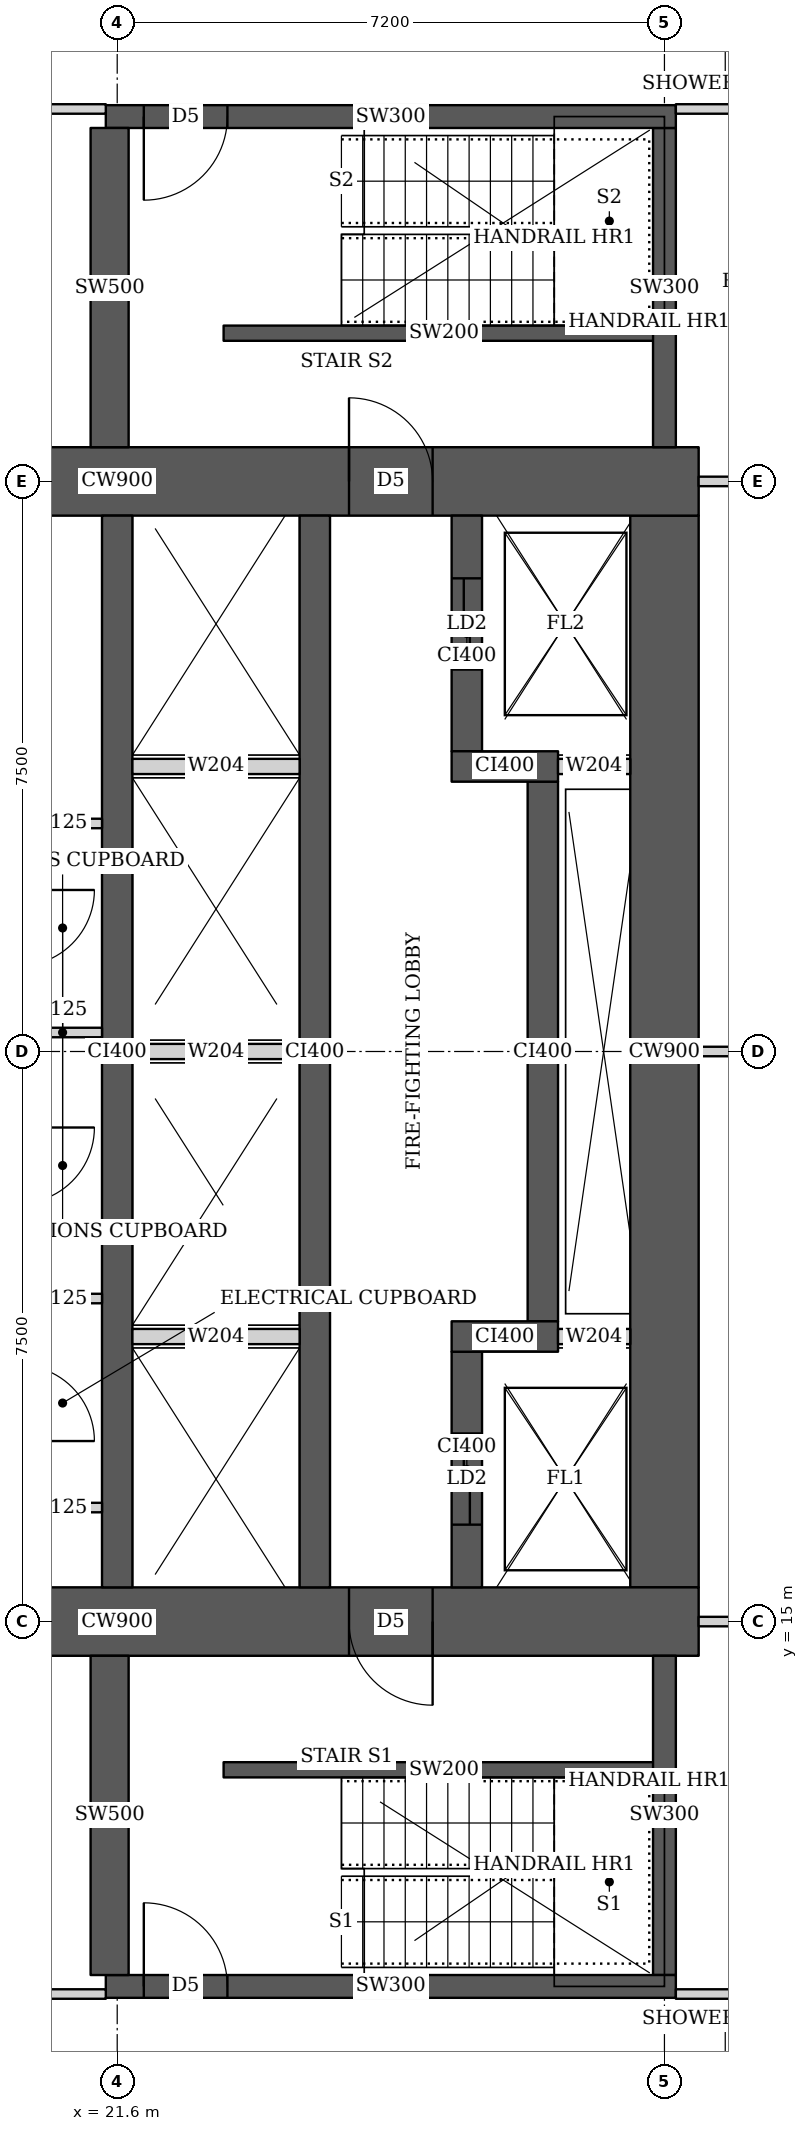
"""IFC4 building model, lengths in metres.
Left out: names, types, materials, properties, quantities, classifications, styles, units other than length and angle.
Written with IfcOpenShell. Run it as: python <this file> out.ifc"""

import sys

from ifc_helpers import new_model, si_unit, direction, frame, frame_2d, origin, place, context, subcontext, project, spatial, rectangle, extrude, element, fill, save


model = new_model("IFC4")
c1 = context("Model", 3, precision=1e-05, world=origin(), true_north=direction((0.0, 1.0)))
c2 = subcontext(c1, "Body", "Model", "MODEL_VIEW")
j1 = project(units=[si_unit("LENGTHUNIT", "METRE"), si_unit("PLANEANGLEUNIT", "RADIAN")], contexts=[c1])
p1 = place(None, origin())
s1 = spatial("IfcSite", under=j1, at=p1, CompositionType="ELEMENT")
p2 = place(p1, origin())
s2 = spatial("IfcBuilding", under=s1, at=p2, CompositionType="ELEMENT")
p3 = place(p2, frame((0.0, 0.0, 100.4)))
s3 = spatial("IfcBuildingStorey", under=s2, at=p3, CompositionType="ELEMENT", Elevation=100.4)
p4 = place(p3, frame((13.95, 15.0, 0.0), z_axis=(0.0, 0.0, 1.0), x_axis=(1.0, 0.0, 0.0)))
e1 = element("IfcWall", 1, at=p4, inside=s3, PredefinedType="SHEAR", context=c2, shape_type="SweptSolid", body=[
    extrude(rectangle(XDim=15.3, YDim=0.9, at=frame_2d((7.65, 0.0))), origin(), (0.0, 0.0, 1.0), 3.75),
])
p5 = place(p4, frame((4.45, 0.0, 0.0)))
e2 = element("IfcOpeningElement", 2, at=p5, cuts=e1, PredefinedType="OPENING", context=c2, shape_type="SweptSolid", body=[
    extrude(rectangle(XDim=1.8, YDim=2.1, at=frame_2d((0.9, 1.05))), frame((0.0, 0.46, 0.0), z_axis=(0.0, -1.0, 0.0), x_axis=(1.0, 0.0, 0.0)), (0.0, 0.0, 1.0), 0.92),
])
p6 = place(p4, frame((10.7, 0.0, 0.0)))
e3 = element("IfcOpeningElement", 3, at=p6, cuts=e1, PredefinedType="OPENING", context=c2, shape_type="SweptSolid", body=[
    extrude(rectangle(XDim=1.1, YDim=2.1, at=frame_2d((0.55, 1.05))), frame((0.0, 0.46, 0.0), z_axis=(0.0, -1.0, 0.0), x_axis=(1.0, 0.0, 0.0)), (0.0, 0.0, 1.0), 0.92),
])
p7 = place(p3, frame((13.95, 30.0, 0.0), z_axis=(0.0, 0.0, 1.0), x_axis=(1.0, 0.0, 0.0)))
e4 = element("IfcWall", 4, at=p7, inside=s3, PredefinedType="SHEAR", context=c2, shape_type="SweptSolid", body=[
    extrude(rectangle(XDim=15.3, YDim=0.9, at=frame_2d((7.65, 0.0))), origin(), (0.0, 0.0, 1.0), 3.75),
])
p8 = place(p7, frame((4.45, 0.0, 0.0)))
e5 = element("IfcOpeningElement", 5, at=p8, cuts=e4, PredefinedType="OPENING", context=c2, shape_type="SweptSolid", body=[
    extrude(rectangle(XDim=1.8, YDim=2.1, at=frame_2d((0.9, 1.05))), frame((0.0, 0.46, 0.0), z_axis=(0.0, -1.0, 0.0), x_axis=(1.0, 0.0, 0.0)), (0.0, 0.0, 1.0), 0.92),
])
p9 = place(p7, frame((10.7, 0.0, 0.0)))
e6 = element("IfcOpeningElement", 6, at=p9, cuts=e4, PredefinedType="OPENING", context=c2, shape_type="SweptSolid", body=[
    extrude(rectangle(XDim=1.1, YDim=2.1, at=frame_2d((0.55, 1.05))), frame((0.0, 0.46, 0.0), z_axis=(0.0, -1.0, 0.0), x_axis=(1.0, 0.0, 0.0)), (0.0, 0.0, 1.0), 0.92),
])
p10 = place(p3, frame((28.8, 15.45, 0.0), z_axis=(0.0, 0.0, 1.0), x_axis=(0.0, 1.0, 0.0)))
e7 = element("IfcWall", 7, at=p10, inside=s3, PredefinedType="SHEAR", context=c2, shape_type="SweptSolid", body=[
    extrude(rectangle(XDim=14.1, YDim=0.9, at=frame_2d((7.05, 0.0))), origin(), (0.0, 0.0, 1.0), 3.75),
])
for number, where, z_axis, x_axis in (
    (8, (21.6, 15.45, 0.0), (0.0, 0.0, 1.0), (0.0, 1.0, 0.0)),
    (9, (24.2, 15.45, 0.0), (0.0, 0.0, 1.0), (0.0, 1.0, 0.0)),
):
    element("IfcWall", number, at=place(p3, frame(where, z_axis=z_axis, x_axis=x_axis)), inside=s3, PredefinedType="SHEAR", context=c2, shape_type="SweptSolid", body=[
        extrude(rectangle(XDim=14.1, YDim=0.4, at=frame_2d((7.05, 0.0))), origin(), (0.0, 0.0, 1.0), 3.75),
    ])
p11 = place(p3, frame((26.2, 15.45, 0.0), z_axis=(0.0, 0.0, 1.0), x_axis=(0.0, 1.0, 0.0)))
e10 = element("IfcWall", 10, at=p11, inside=s3, PredefinedType="SHEAR", context=c2, shape_type="SweptSolid", body=[
    extrude(rectangle(XDim=3.1, YDim=0.4, at=frame_2d((1.55, 0.0))), origin(), (0.0, 0.0, 1.0), 3.75),
])
p12 = place(p11, frame((0.825, 0.0, 0.0)))
e11 = element("IfcOpeningElement", 11, at=p12, cuts=e10, PredefinedType="OPENING", context=c2, shape_type="SweptSolid", body=[
    extrude(rectangle(XDim=1.2, YDim=2.1, at=frame_2d((0.6, 1.05))), frame((0.0, 0.21, 0.0), z_axis=(0.0, -1.0, 0.0), x_axis=(1.0, 0.0, 0.0)), (0.0, 0.0, 1.0), 0.42),
])
p13 = place(p3, frame((26.0, 18.75, 0.0), z_axis=(0.0, 0.0, 1.0), x_axis=(1.0, 0.0, 0.0)))
e12 = element("IfcWall", 12, at=p13, inside=s3, PredefinedType="SHEAR", context=c2, shape_type="SweptSolid", body=[
    extrude(rectangle(XDim=1.4, YDim=0.4, at=frame_2d((0.7, 0.0))), origin(), (0.0, 0.0, 1.0), 3.75),
])
p14 = place(p3, frame((27.2, 18.95, 0.0), z_axis=(0.0, 0.0, 1.0), x_axis=(0.0, 1.0, 0.0)))
e13 = element("IfcWall", 13, at=p14, inside=s3, PredefinedType="SHEAR", context=c2, shape_type="SweptSolid", body=[
    extrude(rectangle(XDim=7.1, YDim=0.4, at=frame_2d((3.55, 0.0))), origin(), (0.0, 0.0, 1.0), 3.75),
])
p15 = place(p3, frame((26.0, 26.25, 0.0), z_axis=(0.0, 0.0, 1.0), x_axis=(1.0, 0.0, 0.0)))
e14 = element("IfcWall", 14, at=p15, inside=s3, PredefinedType="SHEAR", context=c2, shape_type="SweptSolid", body=[
    extrude(rectangle(XDim=1.4, YDim=0.4, at=frame_2d((0.7, 0.0))), origin(), (0.0, 0.0, 1.0), 3.75),
])
p16 = place(p3, frame((26.2, 26.45, 0.0), z_axis=(0.0, 0.0, 1.0), x_axis=(0.0, 1.0, 0.0)))
e15 = element("IfcWall", 15, at=p16, inside=s3, PredefinedType="SHEAR", context=c2, shape_type="SweptSolid", body=[
    extrude(rectangle(XDim=3.1, YDim=0.4, at=frame_2d((1.55, 0.0))), origin(), (0.0, 0.0, 1.0), 3.75),
])
p17 = place(p16, frame((1.075, 0.0, 0.0)))
e16 = element("IfcOpeningElement", 16, at=p17, cuts=e15, PredefinedType="OPENING", context=c2, shape_type="SweptSolid", body=[
    extrude(rectangle(XDim=1.2, YDim=2.1, at=frame_2d((0.6, 1.05))), frame((0.0, 0.21, 0.0), z_axis=(0.0, -1.0, 0.0), x_axis=(1.0, 0.0, 0.0)), (0.0, 0.0, 1.0), 0.42),
])
p18 = place(p3, frame((21.45, 10.2, 0.0), z_axis=(0.0, 0.0, 1.0), x_axis=(1.0, 0.0, 0.0)))
e17 = element("IfcWall", 17, at=p18, inside=s3, PredefinedType="SHEAR", context=c2, shape_type="SweptSolid", body=[
    extrude(rectangle(XDim=7.5, YDim=0.3, at=frame_2d((3.75, 0.0))), origin(), (0.0, 0.0, 1.0), 3.75),
])
p19 = place(p18, frame((0.5, 0.0, 0.0)))
e18 = element("IfcOpeningElement", 18, at=p19, cuts=e17, PredefinedType="OPENING", context=c2, shape_type="SweptSolid", body=[
    extrude(rectangle(XDim=1.1, YDim=2.1, at=frame_2d((0.55, 1.05))), frame((0.0, 0.16, 0.0), z_axis=(0.0, -1.0, 0.0), x_axis=(1.0, 0.0, 0.0)), (0.0, 0.0, 1.0), 0.32),
])
p20 = place(p3, frame((21.5, 10.35, 0.0), z_axis=(0.0, 0.0, 1.0), x_axis=(0.0, 1.0, 0.0)))
e19 = element("IfcWall", 19, at=p20, inside=s3, PredefinedType="SHEAR", context=c2, shape_type="SweptSolid", body=[
    extrude(rectangle(XDim=4.2, YDim=0.5, at=frame_2d((2.1, 0.0))), origin(), (0.0, 0.0, 1.0), 3.75),
])
p21 = place(p3, frame((28.8, 10.35, 0.0), z_axis=(0.0, 0.0, 1.0), x_axis=(0.0, 1.0, 0.0)))
e20 = element("IfcWall", 20, at=p21, inside=s3, PredefinedType="SHEAR", context=c2, shape_type="SweptSolid", body=[
    extrude(rectangle(XDim=4.2, YDim=0.3, at=frame_2d((2.1, 0.0))), origin(), (0.0, 0.0, 1.0), 3.75),
])
p22 = place(p3, frame((21.45, 34.8, 0.0), z_axis=(0.0, 0.0, 1.0), x_axis=(1.0, 0.0, 0.0)))
e21 = element("IfcWall", 21, at=p22, inside=s3, PredefinedType="SHEAR", context=c2, shape_type="SweptSolid", body=[
    extrude(rectangle(XDim=7.5, YDim=0.3, at=frame_2d((3.75, 0.0))), origin(), (0.0, 0.0, 1.0), 3.75),
])
p23 = place(p22, frame((0.5, 0.0, 0.0)))
e22 = element("IfcOpeningElement", 22, at=p23, cuts=e21, PredefinedType="OPENING", context=c2, shape_type="SweptSolid", body=[
    extrude(rectangle(XDim=1.1, YDim=2.1, at=frame_2d((0.55, 1.05))), frame((0.0, 0.16, 0.0), z_axis=(0.0, -1.0, 0.0), x_axis=(1.0, 0.0, 0.0)), (0.0, 0.0, 1.0), 0.32),
])
p24 = place(p3, frame((21.5, 30.45, 0.0), z_axis=(0.0, 0.0, 1.0), x_axis=(0.0, 1.0, 0.0)))
e23 = element("IfcWall", 23, at=p24, inside=s3, PredefinedType="SHEAR", context=c2, shape_type="SweptSolid", body=[
    extrude(rectangle(XDim=4.2, YDim=0.5, at=frame_2d((2.1, 0.0))), origin(), (0.0, 0.0, 1.0), 3.75),
])
p25 = place(p3, frame((28.8, 30.45, 0.0), z_axis=(0.0, 0.0, 1.0), x_axis=(0.0, 1.0, 0.0)))
e24 = element("IfcWall", 24, at=p25, inside=s3, PredefinedType="SHEAR", context=c2, shape_type="SweptSolid", body=[
    extrude(rectangle(XDim=4.2, YDim=0.3, at=frame_2d((2.1, 0.0))), origin(), (0.0, 0.0, 1.0), 3.75),
])
p26 = place(p3, frame((10.163, 10.1, 0.0), z_axis=(0.0, 0.0, 1.0), x_axis=(1.0, 0.0, 0.0)))
e25 = element("IfcWall", 25, at=p26, inside=s3, PredefinedType="PARTITIONING", context=c2, shape_type="SweptSolid", body=[
    extrude(rectangle(XDim=11.287, YDim=0.125, at=frame_2d((5.644, 0.0))), origin(), (0.0, 0.0, 1.0), 3.5),
])
p27 = place(p26, frame((7.832, 0.0, 0.0)))
e26 = element("IfcOpeningElement", 26, at=p27, cuts=e25, PredefinedType="OPENING", context=c2, shape_type="SweptSolid", body=[
    extrude(rectangle(XDim=1.8, YDim=2.1, at=frame_2d((0.9, 1.05))), frame((0.0, 0.073, 0.0), z_axis=(0.0, -1.0, 0.0), x_axis=(1.0, 0.0, 0.0)), (0.0, 0.0, 1.0), 0.145),
])
p28 = place(p3, frame((10.163, 34.9, 0.0), z_axis=(0.0, 0.0, 1.0), x_axis=(1.0, 0.0, 0.0)))
e27 = element("IfcWall", 27, at=p28, inside=s3, PredefinedType="PARTITIONING", context=c2, shape_type="SweptSolid", body=[
    extrude(rectangle(XDim=11.287, YDim=0.125, at=frame_2d((5.644, 0.0))), origin(), (0.0, 0.0, 1.0), 3.5),
])
p29 = place(p28, frame((7.737, 0.0, 0.0)))
e28 = element("IfcOpeningElement", 28, at=p29, cuts=e27, PredefinedType="OPENING", context=c2, shape_type="SweptSolid", body=[
    extrude(rectangle(XDim=1.8, YDim=2.1, at=frame_2d((0.9, 1.05))), frame((0.0, 0.073, 0.0), z_axis=(0.0, -1.0, 0.0), x_axis=(1.0, 0.0, 0.0)), (0.0, 0.0, 1.0), 0.145),
])
p30 = place(p3, frame((28.95, 10.1, 0.0), z_axis=(0.0, 0.0, 1.0), x_axis=(1.0, 0.0, 0.0)))
e29 = element("IfcWall", 29, at=p30, inside=s3, PredefinedType="PARTITIONING", context=c2, shape_type="SweptSolid", body=[
    extrude(rectangle(XDim=9.188, YDim=0.125, at=frame_2d((4.594, 0.0))), origin(), (0.0, 0.0, 1.0), 3.5),
])
p31 = place(p3, frame((28.95, 34.9, 0.0), z_axis=(0.0, 0.0, 1.0), x_axis=(1.0, 0.0, 0.0)))
e30 = element("IfcWall", 30, at=p31, inside=s3, PredefinedType="PARTITIONING", context=c2, shape_type="SweptSolid", body=[
    extrude(rectangle(XDim=4.588, YDim=0.125, at=frame_2d((2.294, 0.0))), origin(), (0.0, 0.0, 1.0), 3.5),
])
p32 = place(p3, frame((29.25, 15.0, 0.0), z_axis=(0.0, 0.0, 1.0), x_axis=(1.0, 0.0, 0.0)))
e31 = element("IfcWall", 31, at=p32, inside=s3, PredefinedType="PARTITIONING", context=c2, shape_type="SweptSolid", body=[
    extrude(rectangle(XDim=5.949, YDim=0.125, at=frame_2d((2.975, 0.0))), origin(), (0.0, 0.0, 1.0), 3.5),
])
for number, where, z_axis, x_axis in (
    (32, (29.25, 22.5, 0.0), (0.0, 0.0, 1.0), (1.0, 0.0, 0.0)),
    (33, (29.25, 30.0, 0.0), (0.0, 0.0, 1.0), (1.0, 0.0, 0.0)),
):
    element("IfcWall", number, at=place(p3, frame(where, z_axis=z_axis, x_axis=x_axis)), inside=s3, PredefinedType="PARTITIONING", context=c2, shape_type="SweptSolid", body=[
        extrude(rectangle(XDim=2.949, YDim=0.125, at=frame_2d((1.475, 0.0))), origin(), (0.0, 0.0, 1.0), 3.5),
    ])
for number, where, z_axis, x_axis in (
    (34, (20.363, 16.5, 0.0), (0.0, 0.0, 1.0), (1.0, 0.0, 0.0)),
    (35, (20.363, 25.5, 0.0), (0.0, 0.0, 1.0), (1.0, 0.0, 0.0)),
    (36, (20.363, 19.25, 0.0), (0.0, 0.0, 1.0), (1.0, 0.0, 0.0)),
    (37, (20.363, 22.75, 0.0), (0.0, 0.0, 1.0), (1.0, 0.0, 0.0)),
):
    element("IfcWall", number, at=place(p3, frame(where, z_axis=z_axis, x_axis=x_axis)), inside=s3, PredefinedType="PARTITIONING", context=c2, shape_type="SweptSolid", body=[
        extrude(rectangle(XDim=1.037, YDim=0.125, at=frame_2d((0.519, 0.0))), origin(), (0.0, 0.0, 1.0), 3.5),
    ])
for number, where, z_axis, x_axis in (
    (38, (23.0, 13.05, 0.0), (0.0, 0.0, 1.0), (1.0, 0.0, 0.0)),
    (39, (23.0, 31.95, 0.0), (0.0, 0.0, 1.0), (1.0, 0.0, 0.0)),
):
    element("IfcWall", number, at=place(p3, frame(where, z_axis=z_axis, x_axis=x_axis)), inside=s3, PredefinedType="SHEAR", context=c2, shape_type="SweptSolid", body=[
        extrude(rectangle(XDim=5.8, YDim=0.2, at=frame_2d((2.9, 0.0))), origin(), (0.0, 0.0, 1.0), 3.75),
    ])
for number, where, z_axis, x_axis in (
    (40, (21.8, 18.75, 0.0), (0.0, 0.0, 1.0), (1.0, 0.0, 0.0)),
    (41, (21.8, 22.5, 0.0), (0.0, 0.0, 1.0), (1.0, 0.0, 0.0)),
    (42, (21.8, 26.25, 0.0), (0.0, 0.0, 1.0), (1.0, 0.0, 0.0)),
):
    element("IfcWall", number, at=place(p3, frame(where, z_axis=z_axis, x_axis=x_axis)), inside=s3, PredefinedType="SOLIDWALL", context=c2, shape_type="SweptSolid", body=[
        extrude(rectangle(XDim=2.2, YDim=0.2, at=frame_2d((1.1, 0.0))), origin(), (0.0, 0.0, 1.0), 3.5),
    ])
for number, where, z_axis, x_axis in (
    (43, (27.4, 18.75, 0.0), (0.0, 0.0, 1.0), (1.0, 0.0, 0.0)),
    (44, (27.4, 26.25, 0.0), (0.0, 0.0, 1.0), (1.0, 0.0, 0.0)),
):
    element("IfcWall", number, at=place(p3, frame(where, z_axis=z_axis, x_axis=x_axis)), inside=s3, PredefinedType="SOLIDWALL", context=c2, shape_type="SweptSolid", body=[
        extrude(rectangle(XDim=0.95, YDim=0.2, at=frame_2d((0.475, 0.0))), origin(), (0.0, 0.0, 1.0), 3.5),
    ])
p33 = place(p6, origin())
e45 = element("IfcDoor", 45, at=p33, inside=s3, OperationType="SINGLE_SWING_LEFT", PredefinedType="DOOR", context=c2, shape_type="SweptSolid", body=[
    extrude(rectangle(XDim=1.1, YDim=2.1, at=frame_2d((0.55, 1.05))), frame((0.0, 0.025, 0.0), z_axis=(0.0, -1.0, 0.0), x_axis=(1.0, 0.0, 0.0)), (0.0, 0.0, 1.0), 0.05),
])
fill(e3, e45)
p34 = place(p9, origin())
e46 = element("IfcDoor", 46, at=p34, inside=s3, OperationType="SINGLE_SWING_LEFT", PredefinedType="DOOR", context=c2, shape_type="SweptSolid", body=[
    extrude(rectangle(XDim=1.1, YDim=2.1, at=frame_2d((0.55, 1.05))), frame((0.0, 0.025, 0.0), z_axis=(0.0, -1.0, 0.0), x_axis=(1.0, 0.0, 0.0)), (0.0, 0.0, 1.0), 0.05),
])
fill(e6, e46)
p35 = place(p12, origin())
e47 = element("IfcDoor", 47, at=p35, inside=s3, OperationType="DOUBLE_DOOR_SLIDING", PredefinedType="DOOR", context=c2, shape_type="SweptSolid", body=[
    extrude(rectangle(XDim=1.2, YDim=2.1, at=frame_2d((0.6, 1.05))), frame((0.0, 0.025, 0.0), z_axis=(0.0, -1.0, 0.0), x_axis=(1.0, 0.0, 0.0)), (0.0, 0.0, 1.0), 0.05),
])
fill(e11, e47)
p36 = place(p17, origin())
e48 = element("IfcDoor", 48, at=p36, inside=s3, OperationType="DOUBLE_DOOR_SLIDING", PredefinedType="DOOR", context=c2, shape_type="SweptSolid", body=[
    extrude(rectangle(XDim=1.2, YDim=2.1, at=frame_2d((0.6, 1.05))), frame((0.0, 0.025, 0.0), z_axis=(0.0, -1.0, 0.0), x_axis=(1.0, 0.0, 0.0)), (0.0, 0.0, 1.0), 0.05),
])
fill(e16, e48)
p37 = place(p19, origin())
e49 = element("IfcDoor", 49, at=p37, inside=s3, OperationType="SINGLE_SWING_LEFT", PredefinedType="DOOR", context=c2, shape_type="SweptSolid", body=[
    extrude(rectangle(XDim=1.1, YDim=2.1, at=frame_2d((0.55, 1.05))), frame((0.0, 0.025, 0.0), z_axis=(0.0, -1.0, 0.0), x_axis=(1.0, 0.0, 0.0)), (0.0, 0.0, 1.0), 0.05),
])
fill(e18, e49)
p38 = place(p23, origin())
e50 = element("IfcDoor", 50, at=p38, inside=s3, OperationType="SINGLE_SWING_RIGHT", PredefinedType="DOOR", context=c2, shape_type="SweptSolid", body=[
    extrude(rectangle(XDim=1.1, YDim=2.1, at=frame_2d((0.55, 1.05))), frame((0.0, 0.025, 0.0), z_axis=(0.0, -1.0, 0.0), x_axis=(1.0, 0.0, 0.0)), (0.0, 0.0, 1.0), 0.05),
])
fill(e22, e50)
save(model, sys.argv[1])
